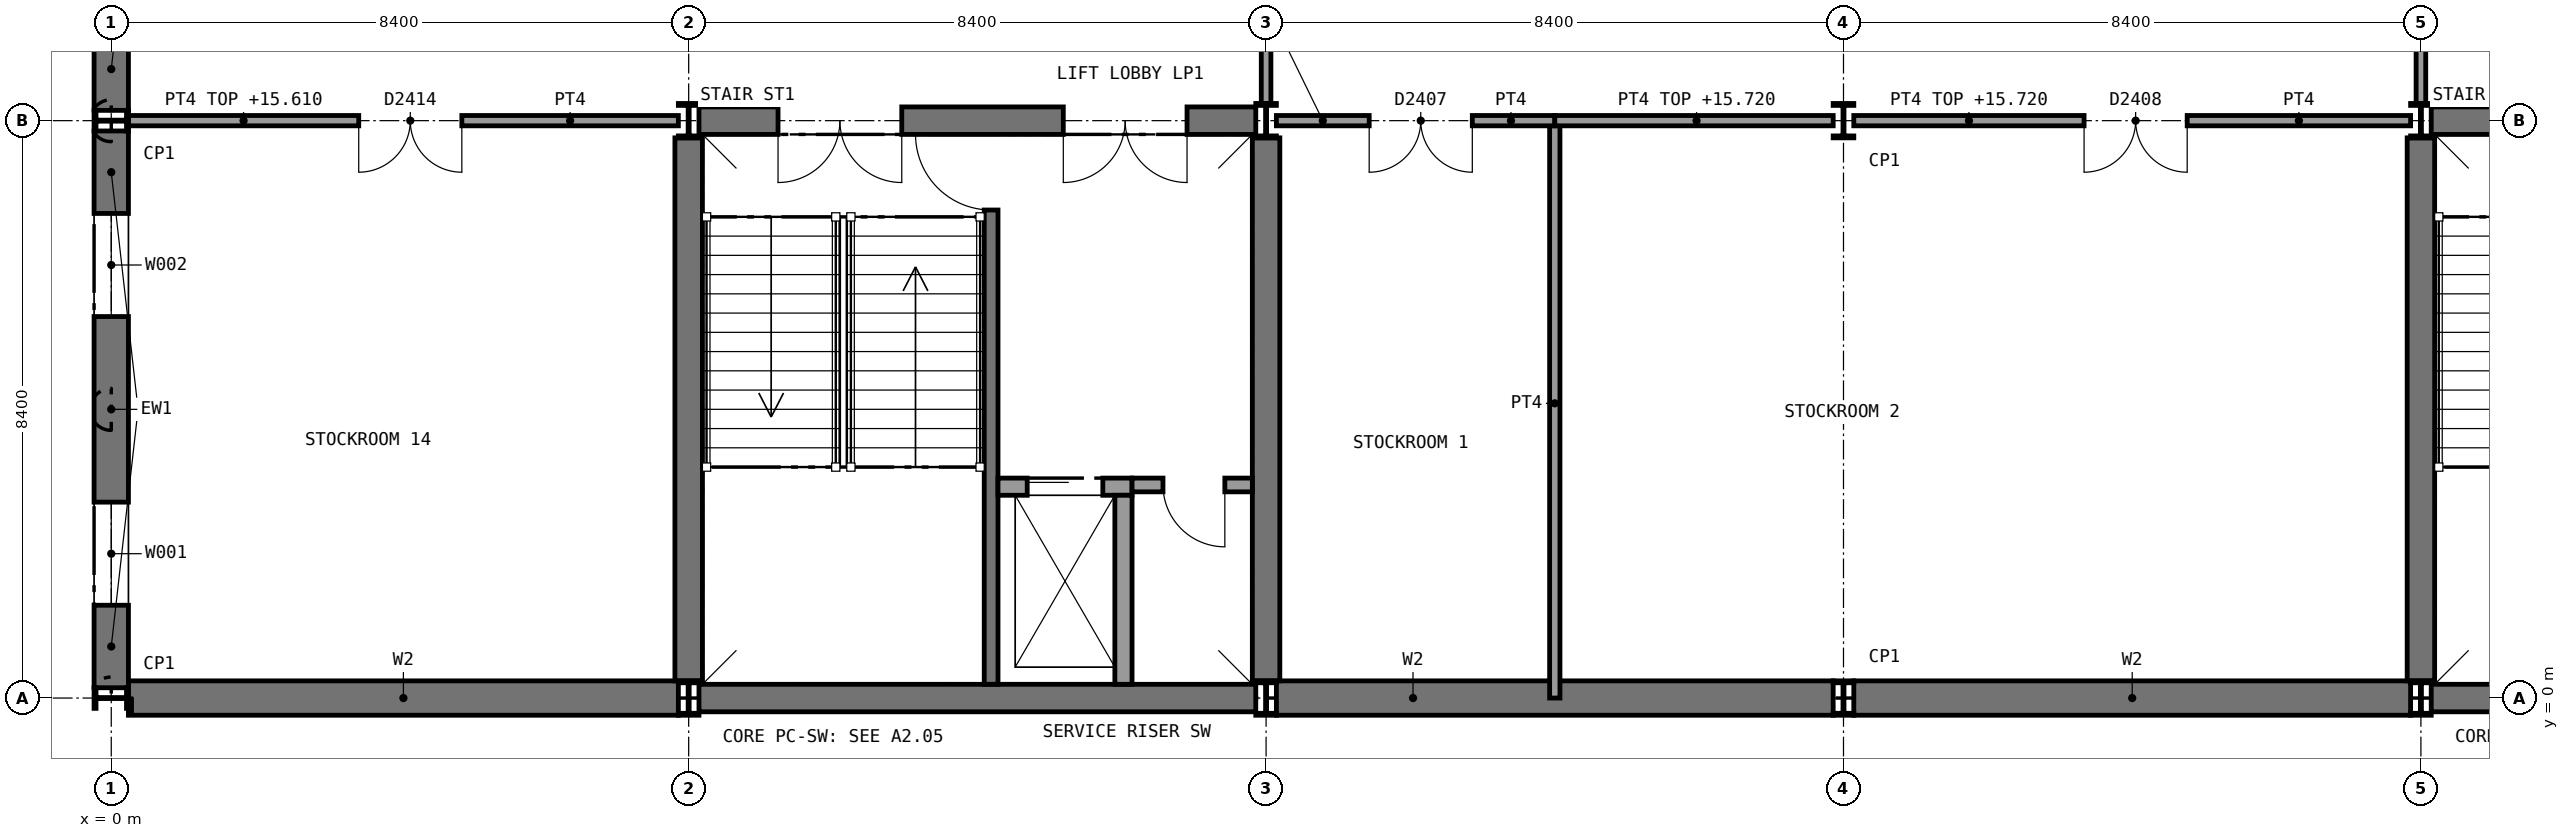
"""IFC4 building model, lengths in metres.
Left out: names, types, materials, properties, quantities, classifications, styles, units other than length and angle.
Written with IfcOpenShell. Run it as: python <this file> out.ifc"""

import sys

from ifc_helpers import new_model, si_unit, direction, frame, frame_2d, origin, origin_2d, place, context, subcontext, project, spatial, rectangle, i_section, extrude, element, fill, save


model = new_model("IFC4")
c1 = context("Model", 3, precision=1e-05, world=origin(), true_north=direction((0.0, 1.0)))
c2 = subcontext(c1, "Body", "Model", "MODEL_VIEW")
j1 = project(units=[si_unit("LENGTHUNIT", "METRE"), si_unit("PLANEANGLEUNIT", "RADIAN")], contexts=[c1])
p1 = place(None, origin())
s1 = spatial("IfcSite", under=j1, at=p1, CompositionType="ELEMENT")
p2 = place(p1, origin())
s2 = spatial("IfcBuilding", under=s1, at=p2, CompositionType="ELEMENT")
p3 = place(p2, frame((0.0, 0.0, 11.4)))
s3 = spatial("IfcBuildingStorey", under=s2, at=p3, CompositionType="ELEMENT", Elevation=11.4)
p4 = place(p3, frame((0.25, 0.0, 0.0), z_axis=(0.0, 0.0, 1.0), x_axis=(1.0, 0.0, 0.0)))
e1 = element("IfcWall", 1, at=p4, inside=s3, PredefinedType="SHEAR", context=c2, shape_type="SweptSolid", body=[
    extrude(rectangle(XDim=8.0, YDim=0.5, at=frame_2d((4.0, 0.0))), origin(), (0.0, 0.0, 1.0), 4.65),
])
p5 = place(p3, frame((16.95, 0.0, 0.0), z_axis=(0.0, 0.0, 1.0), x_axis=(1.0, 0.0, 0.0)))
e2 = element("IfcWall", 2, at=p5, inside=s3, PredefinedType="SHEAR", context=c2, shape_type="SweptSolid", body=[
    extrude(rectangle(XDim=8.1, YDim=0.5, at=frame_2d((4.05, 0.0))), origin(), (0.0, 0.0, 1.0), 4.65),
])
p6 = place(p3, frame((25.35, 0.0, 0.0), z_axis=(0.0, 0.0, 1.0), x_axis=(1.0, 0.0, 0.0)))
e3 = element("IfcWall", 3, at=p6, inside=s3, PredefinedType="SHEAR", context=c2, shape_type="SweptSolid", body=[
    extrude(rectangle(XDim=8.1, YDim=0.5, at=frame_2d((4.05, 0.0))), origin(), (0.0, 0.0, 1.0), 4.65),
])
p7 = place(p3, frame((8.55, 0.0, 0.0), z_axis=(0.0, 0.0, 1.0), x_axis=(1.0, 0.0, 0.0)))
e4 = element("IfcWall", 4, at=p7, inside=s3, PredefinedType="SHEAR", context=c2, shape_type="SweptSolid", body=[
    extrude(rectangle(XDim=8.1, YDim=0.4, at=frame_2d((4.05, 0.0))), origin(), (0.0, 0.0, 1.0), 4.65),
])
p8 = place(p3, frame((8.55, 8.4, 0.0), z_axis=(0.0, 0.0, 1.0), x_axis=(1.0, 0.0, 0.0)))
e5 = element("IfcWall", 5, at=p8, inside=s3, PredefinedType="SHEAR", context=c2, shape_type="SweptSolid", body=[
    extrude(rectangle(XDim=8.1, YDim=0.4, at=frame_2d((4.05, 0.0))), origin(), (0.0, 0.0, 1.0), 4.65),
])
p9 = place(p8, frame((1.15, 0.0, 0.0)))
e6 = element("IfcOpeningElement", 6, at=p9, cuts=e5, PredefinedType="OPENING", context=c2, shape_type="SweptSolid", body=[
    extrude(rectangle(XDim=1.8, YDim=2.1, at=frame_2d((0.9, 1.05))), frame((0.0, 0.21, 0.0), z_axis=(0.0, -1.0, 0.0), x_axis=(1.0, 0.0, 0.0)), (0.0, 0.0, 1.0), 0.42),
])
p10 = place(p8, frame((5.3, 0.0, 0.0)))
e7 = element("IfcOpeningElement", 7, at=p10, cuts=e5, PredefinedType="OPENING", context=c2, shape_type="SweptSolid", body=[
    extrude(rectangle(XDim=1.8, YDim=2.1, at=frame_2d((0.9, 1.05))), frame((0.0, 0.21, 0.0), z_axis=(0.0, -1.0, 0.0), x_axis=(1.0, 0.0, 0.0)), (0.0, 0.0, 1.0), 0.42),
])
for number, where, z_axis, x_axis in (
    (8, (8.4, 0.25, 0.0), (0.0, 0.0, 1.0), (0.0, 1.0, 0.0)),
    (9, (16.8, 0.25, 0.0), (0.0, 0.0, 1.0), (0.0, 1.0, 0.0)),
):
    element("IfcWall", number, at=place(p3, frame(where, z_axis=z_axis, x_axis=x_axis)), inside=s3, PredefinedType="SHEAR", context=c2, shape_type="SweptSolid", body=[
        extrude(rectangle(XDim=7.9, YDim=0.4, at=frame_2d((3.95, 0.0))), origin(), (0.0, 0.0, 1.0), 4.65),
    ])
p11 = place(p3, frame((33.75, 0.0, 0.0), z_axis=(0.0, 0.0, 1.0), x_axis=(1.0, 0.0, 0.0)))
e10 = element("IfcWall", 10, at=p11, inside=s3, PredefinedType="SHEAR", context=c2, shape_type="SweptSolid", body=[
    extrude(rectangle(XDim=8.1, YDim=0.4, at=frame_2d((4.05, 0.0))), origin(), (0.0, 0.0, 1.0), 4.65),
])
p12 = place(p3, frame((33.75, 8.4, 0.0), z_axis=(0.0, 0.0, 1.0), x_axis=(1.0, 0.0, 0.0)))
e11 = element("IfcWall", 11, at=p12, inside=s3, PredefinedType="SHEAR", context=c2, shape_type="SweptSolid", body=[
    extrude(rectangle(XDim=8.1, YDim=0.4, at=frame_2d((4.05, 0.0))), origin(), (0.0, 0.0, 1.0), 4.65),
])
p13 = place(p12, frame((1.15, 0.0, 0.0)))
e12 = element("IfcOpeningElement", 12, at=p13, cuts=e11, PredefinedType="OPENING", context=c2, shape_type="SweptSolid", body=[
    extrude(rectangle(XDim=1.8, YDim=2.1, at=frame_2d((0.9, 1.05))), frame((0.0, 0.21, 0.0), z_axis=(0.0, -1.0, 0.0), x_axis=(1.0, 0.0, 0.0)), (0.0, 0.0, 1.0), 0.42),
])
p14 = place(p12, frame((5.3, 0.0, 0.0)))
e13 = element("IfcOpeningElement", 13, at=p14, cuts=e11, PredefinedType="OPENING", context=c2, shape_type="SweptSolid", body=[
    extrude(rectangle(XDim=1.8, YDim=2.1, at=frame_2d((0.9, 1.05))), frame((0.0, 0.21, 0.0), z_axis=(0.0, -1.0, 0.0), x_axis=(1.0, 0.0, 0.0)), (0.0, 0.0, 1.0), 0.42),
])
p15 = place(p3, frame((33.6, 0.25, 0.0), z_axis=(0.0, 0.0, 1.0), x_axis=(0.0, 1.0, 0.0)))
e14 = element("IfcWall", 14, at=p15, inside=s3, PredefinedType="SHEAR", context=c2, shape_type="SweptSolid", body=[
    extrude(rectangle(XDim=7.9, YDim=0.4, at=frame_2d((3.95, 0.0))), origin(), (0.0, 0.0, 1.0), 4.65),
])
for number, where, z_axis, x_axis in (
    (15, (0.0, 0.0, 0.0), (0.0, 0.0, 1.0), (0.0, 1.0, 0.0)),
    (16, (0.0, 8.4, 0.0), (0.0, 0.0, 1.0), (0.0, 1.0, 0.0)),
    (17, (8.4, 0.0, 0.0), (0.0, 0.0, 1.0), (1.0, 0.0, 0.0)),
    (18, (8.4, 8.4, 0.0), (0.0, 0.0, 1.0), (1.0, 0.0, 0.0)),
    (19, (16.8, 0.0, 0.0), (0.0, 0.0, 1.0), (1.0, 0.0, 0.0)),
    (20, (16.8, 8.4, 0.0), (0.0, 0.0, 1.0), (1.0, 0.0, 0.0)),
    (21, (25.2, 0.0, 0.0), (0.0, 0.0, 1.0), (1.0, 0.0, 0.0)),
    (22, (25.2, 8.4, 0.0), (0.0, 0.0, 1.0), (1.0, 0.0, 0.0)),
    (23, (33.6, 0.0, 0.0), (0.0, 0.0, 1.0), (1.0, 0.0, 0.0)),
    (24, (33.6, 8.4, 0.0), (0.0, 0.0, 1.0), (1.0, 0.0, 0.0)),
):
    element("IfcColumn", number, at=place(p3, frame(where, z_axis=z_axis, x_axis=x_axis)), inside=s3, PredefinedType="COLUMN", context=c2, shape_type="SweptSolid", body=[
        extrude(i_section(OverallWidth=0.3, OverallDepth=0.5, WebThickness=0.014, FlangeThickness=0.028, FilletRadius=0.027, at=origin_2d()), origin(), (0.0, 0.0, 1.0), 4.8),
    ])
p16 = place(p3, frame((21.0, 0.0, 0.0), z_axis=(0.0, 0.0, 1.0), x_axis=(0.0, 1.0, 0.0)))
e25 = element("IfcWall", 25, at=p16, inside=s3, PredefinedType="SOLIDWALL", context=c2, shape_type="SweptSolid", body=[
    extrude(rectangle(XDim=8.4, YDim=0.15, at=frame_2d((4.2, 0.0))), origin(), (0.0, 0.0, 1.0), 4.65),
])
p17 = place(p3, frame((16.95, 8.4, 0.0), z_axis=(0.0, 0.0, 1.0), x_axis=(1.0, 0.0, 0.0)))
e26 = element("IfcWall", 26, at=p17, inside=s3, PredefinedType="SOLIDWALL", context=c2, shape_type="SweptSolid", body=[
    extrude(rectangle(XDim=4.05, YDim=0.15, at=frame_2d((2.025, 0.0))), origin(), (0.0, 0.0, 1.0), 4.32),
])
p18 = place(p17, frame((1.35, 0.0, 0.0)))
e27 = element("IfcOpeningElement", 27, at=p18, cuts=e26, PredefinedType="OPENING", context=c2, shape_type="SweptSolid", body=[
    extrude(rectangle(XDim=1.5, YDim=2.1, at=frame_2d((0.75, 1.05))), frame((0.0, 0.085, 0.0), z_axis=(0.0, -1.0, 0.0), x_axis=(1.0, 0.0, 0.0)), (0.0, 0.0, 1.0), 0.17),
])
p19 = place(p3, frame((21.0, 8.4, 0.0), z_axis=(0.0, 0.0, 1.0), x_axis=(1.0, 0.0, 0.0)))
e28 = element("IfcWall", 28, at=p19, inside=s3, PredefinedType="SOLIDWALL", context=c2, shape_type="SweptSolid", body=[
    extrude(rectangle(XDim=4.05, YDim=0.15, at=frame_2d((2.025, 0.0))), origin(), (0.0, 0.0, 1.0), 4.32),
])
p20 = place(p3, frame((25.35, 8.4, 0.0), z_axis=(0.0, 0.0, 1.0), x_axis=(1.0, 0.0, 0.0)))
e29 = element("IfcWall", 29, at=p20, inside=s3, PredefinedType="SOLIDWALL", context=c2, shape_type="SweptSolid", body=[
    extrude(rectangle(XDim=8.1, YDim=0.15, at=frame_2d((4.05, 0.0))), origin(), (0.0, 0.0, 1.0), 4.32),
])
p21 = place(p20, frame((3.35, 0.0, 0.0)))
e30 = element("IfcOpeningElement", 30, at=p21, cuts=e29, PredefinedType="OPENING", context=c2, shape_type="SweptSolid", body=[
    extrude(rectangle(XDim=1.5, YDim=2.1, at=frame_2d((0.75, 1.05))), frame((0.0, 0.085, 0.0), z_axis=(0.0, -1.0, 0.0), x_axis=(1.0, 0.0, 0.0)), (0.0, 0.0, 1.0), 0.17),
])
p22 = place(p3, frame((0.25, 8.4, 0.0), z_axis=(0.0, 0.0, 1.0), x_axis=(1.0, 0.0, 0.0)))
e31 = element("IfcWall", 31, at=p22, inside=s3, PredefinedType="SOLIDWALL", context=c2, shape_type="SweptSolid", body=[
    extrude(rectangle(XDim=8.0, YDim=0.15, at=frame_2d((4.0, 0.0))), origin(), (0.0, 0.0, 1.0), 4.21),
])
p23 = place(p22, frame((3.35, 0.0, 0.0)))
e32 = element("IfcOpeningElement", 32, at=p23, cuts=e31, PredefinedType="OPENING", context=c2, shape_type="SweptSolid", body=[
    extrude(rectangle(XDim=1.5, YDim=2.1, at=frame_2d((0.75, 1.05))), frame((0.0, 0.085, 0.0), z_axis=(0.0, -1.0, 0.0), x_axis=(1.0, 0.0, 0.0)), (0.0, 0.0, 1.0), 0.17),
])
for number, where, z_axis, x_axis in (
    (33, (16.8, 8.65, 0.0), (0.0, 0.0, 1.0), (0.0, 1.0, 0.0)),
    (34, (33.6, 8.65, 0.0), (0.0, 0.0, 1.0), (0.0, 1.0, 0.0)),
):
    element("IfcWall", number, at=place(p3, frame(where, z_axis=z_axis, x_axis=x_axis)), inside=s3, PredefinedType="PARTITIONING", context=c2, shape_type="SweptSolid", body=[
        extrude(rectangle(XDim=3.1, YDim=0.14, at=frame_2d((1.55, 0.0))), origin(), (0.0, 0.0, 1.0), 4.21),
    ])
p24 = place(p3, frame((0.0, 0.15, 0.0), z_axis=(0.0, 0.0, 1.0), x_axis=(0.0, 1.0, 0.0)))
e35 = element("IfcWall", 35, at=p24, inside=s3, PredefinedType="STANDARD", context=c2, shape_type="SweptSolid", body=[
    extrude(rectangle(XDim=8.1, YDim=0.5, at=frame_2d((4.05, 0.0))), origin(), (0.0, 0.0, 1.0), 4.65),
])
p25 = place(p24, frame((1.2, 0.0, 0.9)))
e36 = element("IfcOpeningElement", 36, at=p25, cuts=e35, PredefinedType="OPENING", context=c2, shape_type="SweptSolid", body=[
    extrude(rectangle(XDim=1.5, YDim=3.0, at=frame_2d((0.75, 1.5))), frame((0.0, 0.26, 0.0), z_axis=(0.0, -1.0, 0.0), x_axis=(1.0, 0.0, 0.0)), (0.0, 0.0, 1.0), 0.52),
])
p26 = place(p24, frame((5.4, 0.0, 0.9)))
e37 = element("IfcOpeningElement", 37, at=p26, cuts=e35, PredefinedType="OPENING", context=c2, shape_type="SweptSolid", body=[
    extrude(rectangle(XDim=1.5, YDim=3.0, at=frame_2d((0.75, 1.5))), frame((0.0, 0.26, 0.0), z_axis=(0.0, -1.0, 0.0), x_axis=(1.0, 0.0, 0.0)), (0.0, 0.0, 1.0), 0.52),
])
p27 = place(p3, frame((0.0, 8.55, 0.0), z_axis=(0.0, 0.0, 1.0), x_axis=(0.0, 1.0, 0.0)))
e38 = element("IfcWall", 38, at=p27, inside=s3, PredefinedType="STANDARD", context=c2, shape_type="SweptSolid", body=[
    extrude(rectangle(XDim=8.1, YDim=0.5, at=frame_2d((4.05, 0.0))), origin(), (0.0, 0.0, 1.0), 4.65),
])
p28 = place(p27, frame((1.2, 0.0, 0.9)))
e39 = element("IfcOpeningElement", 39, at=p28, cuts=e38, PredefinedType="OPENING", context=c2, shape_type="SweptSolid", body=[
    extrude(rectangle(XDim=1.5, YDim=3.0, at=frame_2d((0.75, 1.5))), frame((0.0, 0.26, 0.0), z_axis=(0.0, -1.0, 0.0), x_axis=(1.0, 0.0, 0.0)), (0.0, 0.0, 1.0), 0.52),
])
p29 = place(p27, frame((5.4, 0.0, 0.9)))
e40 = element("IfcOpeningElement", 40, at=p29, cuts=e38, PredefinedType="OPENING", context=c2, shape_type="SweptSolid", body=[
    extrude(rectangle(XDim=1.5, YDim=3.0, at=frame_2d((0.75, 1.5))), frame((0.0, 0.26, 0.0), z_axis=(0.0, -1.0, 0.0), x_axis=(1.0, 0.0, 0.0)), (0.0, 0.0, 1.0), 0.52),
])
p30 = place(p3, frame((12.8, 0.2, 0.0), z_axis=(0.0, 0.0, 1.0), x_axis=(0.0, 1.0, 0.0)))
e41 = element("IfcWall", 41, at=p30, inside=s3, PredefinedType="SHEAR", context=c2, shape_type="SweptSolid", body=[
    extrude(rectangle(XDim=8.0, YDim=0.2, at=frame_2d((4.0, 0.0))), origin(), (0.0, 0.0, 1.0), 4.65),
])
p31 = place(p30, frame((6.9, 0.0, 0.0)))
e42 = element("IfcOpeningElement", 42, at=p31, cuts=e41, PredefinedType="OPENING", context=c2, shape_type="SweptSolid", body=[
    extrude(rectangle(XDim=1.11, YDim=2.1, at=frame_2d((0.555, 1.05))), frame((0.0, 0.11, 0.0), z_axis=(0.0, -1.0, 0.0), x_axis=(1.0, 0.0, 0.0)), (0.0, 0.0, 1.0), 0.22),
])
p32 = place(p3, frame((12.9, 3.075, 0.0), z_axis=(0.0, 0.0, 1.0), x_axis=(1.0, 0.0, 0.0)))
e43 = element("IfcWall", 43, at=p32, inside=s3, PredefinedType="SOLIDWALL", context=c2, shape_type="SweptSolid", body=[
    extrude(rectangle(XDim=1.95, YDim=0.25, at=frame_2d((0.975, 0.0))), origin(), (0.0, 0.0, 1.0), 4.8),
])
p33 = place(p32, frame((0.425, 0.0, 0.0)))
e44 = element("IfcOpeningElement", 44, at=p33, cuts=e43, PredefinedType="OPENING", context=c2, shape_type="SweptSolid", body=[
    extrude(rectangle(XDim=1.1, YDim=2.1, at=frame_2d((0.55, 1.05))), frame((0.0, 0.135, 0.0), z_axis=(0.0, -1.0, 0.0), x_axis=(1.0, 0.0, 0.0)), (0.0, 0.0, 1.0), 0.27),
])
p34 = place(p3, frame((14.725, 0.2, 0.0), z_axis=(0.0, 0.0, 1.0), x_axis=(0.0, 1.0, 0.0)))
e45 = element("IfcWall", 45, at=p34, inside=s3, PredefinedType="SOLIDWALL", context=c2, shape_type="SweptSolid", body=[
    extrude(rectangle(XDim=2.75, YDim=0.25, at=frame_2d((1.375, 0.0))), origin(), (0.0, 0.0, 1.0), 4.8),
])
p35 = place(p3, frame((14.85, 3.1, 0.0), z_axis=(0.0, 0.0, 1.0), x_axis=(1.0, 0.0, 0.0)))
e46 = element("IfcWall", 46, at=p35, inside=s3, PredefinedType="PARTITIONING", context=c2, shape_type="SweptSolid", body=[
    extrude(rectangle(XDim=1.75, YDim=0.2, at=frame_2d((0.875, 0.0))), origin(), (0.0, 0.0, 1.0), 4.65),
])
p36 = place(p35, frame((0.45, 0.0, 0.0)))
e47 = element("IfcOpeningElement", 47, at=p36, cuts=e46, PredefinedType="OPENING", context=c2, shape_type="SweptSolid", body=[
    extrude(rectangle(XDim=0.9, YDim=2.1, at=frame_2d((0.45, 1.05))), frame((0.0, 0.11, 0.0), z_axis=(0.0, -1.0, 0.0), x_axis=(1.0, 0.0, 0.0)), (0.0, 0.0, 1.0), 0.22),
])
p37 = place(p18, frame((1.5, 0.0, 0.0), z_axis=(0.0, 0.0, 1.0), x_axis=(-1.0, 0.0, 0.0)))
e48 = element("IfcDoor", 48, at=p37, inside=s3, OperationType="DOUBLE_DOOR_SINGLE_SWING", PredefinedType="DOOR", context=c2, shape_type="SweptSolid", body=[
    extrude(rectangle(XDim=1.5, YDim=2.1, at=frame_2d((0.75, 1.05))), frame((0.0, 0.025, 0.0), z_axis=(0.0, -1.0, 0.0), x_axis=(1.0, 0.0, 0.0)), (0.0, 0.0, 1.0), 0.05),
])
fill(e27, e48)
p38 = place(p21, frame((1.5, 0.0, 0.0), z_axis=(0.0, 0.0, 1.0), x_axis=(-1.0, 0.0, 0.0)))
e49 = element("IfcDoor", 49, at=p38, inside=s3, OperationType="DOUBLE_DOOR_SINGLE_SWING", PredefinedType="DOOR", context=c2, shape_type="SweptSolid", body=[
    extrude(rectangle(XDim=1.5, YDim=2.1, at=frame_2d((0.75, 1.05))), frame((0.0, 0.025, 0.0), z_axis=(0.0, -1.0, 0.0), x_axis=(1.0, 0.0, 0.0)), (0.0, 0.0, 1.0), 0.05),
])
fill(e30, e49)
p39 = place(p23, frame((1.5, 0.0, 0.0), z_axis=(0.0, 0.0, 1.0), x_axis=(-1.0, 0.0, 0.0)))
e50 = element("IfcDoor", 50, at=p39, inside=s3, OperationType="DOUBLE_DOOR_SINGLE_SWING", PredefinedType="DOOR", context=c2, shape_type="SweptSolid", body=[
    extrude(rectangle(XDim=1.5, YDim=2.1, at=frame_2d((0.75, 1.05))), frame((0.0, 0.025, 0.0), z_axis=(0.0, -1.0, 0.0), x_axis=(1.0, 0.0, 0.0)), (0.0, 0.0, 1.0), 0.05),
])
fill(e32, e50)
p40 = place(p25, origin())
e51 = element("IfcWindow", 51, at=p40, inside=s3, PartitioningType="SINGLE_PANEL", PredefinedType="WINDOW", context=c2, shape_type="SweptSolid", body=[
    extrude(rectangle(XDim=1.5, YDim=3.0, at=frame_2d((0.75, 1.5))), frame((0.0, 0.03, 0.0), z_axis=(0.0, -1.0, 0.0), x_axis=(1.0, 0.0, 0.0)), (0.0, 0.0, 1.0), 0.06),
])
fill(e36, e51)
p41 = place(p26, origin())
e52 = element("IfcWindow", 52, at=p41, inside=s3, PartitioningType="SINGLE_PANEL", PredefinedType="WINDOW", context=c2, shape_type="SweptSolid", body=[
    extrude(rectangle(XDim=1.5, YDim=3.0, at=frame_2d((0.75, 1.5))), frame((0.0, 0.03, 0.0), z_axis=(0.0, -1.0, 0.0), x_axis=(1.0, 0.0, 0.0)), (0.0, 0.0, 1.0), 0.06),
])
fill(e37, e52)
p42 = place(p31, origin())
e53 = element("IfcDoor", 53, at=p42, inside=s3, OperationType="SINGLE_SWING_RIGHT", PredefinedType="DOOR", context=c2, shape_type="SweptSolid", body=[
    extrude(rectangle(XDim=1.1, YDim=2.1, at=frame_2d((0.55, 1.05))), frame((0.0, 0.025, 0.0), z_axis=(0.0, -1.0, 0.0), x_axis=(1.0, 0.0, 0.0)), (0.0, 0.0, 1.0), 0.05),
])
fill(e42, e53)
p43 = place(p33, origin())
e54 = element("IfcDoor", 54, at=p43, inside=s3, OperationType="SLIDING_TO_LEFT", PredefinedType="DOOR", context=c2, shape_type="SweptSolid", body=[
    extrude(rectangle(XDim=1.1, YDim=2.1, at=frame_2d((0.55, 1.05))), frame((0.0, 0.025, 0.0), z_axis=(0.0, -1.0, 0.0), x_axis=(1.0, 0.0, 0.0)), (0.0, 0.0, 1.0), 0.05),
])
fill(e44, e54)
p44 = place(p36, frame((0.9, 0.0, 0.0), z_axis=(0.0, 0.0, 1.0), x_axis=(-1.0, 0.0, 0.0)))
e55 = element("IfcDoor", 55, at=p44, inside=s3, OperationType="SINGLE_SWING_LEFT", PredefinedType="DOOR", context=c2, shape_type="SweptSolid", body=[
    extrude(rectangle(XDim=0.9, YDim=2.1, at=frame_2d((0.45, 1.05))), frame((0.0, 0.025, 0.0), z_axis=(0.0, -1.0, 0.0), x_axis=(1.0, 0.0, 0.0)), (0.0, 0.0, 1.0), 0.05),
])
fill(e47, e55)
p45 = place(p9, frame((1.8, 0.0, 0.0), z_axis=(0.0, 0.0, 1.0), x_axis=(-1.0, 0.0, 0.0)))
e56 = element("IfcDoor", 56, at=p45, inside=s3, OperationType="DOUBLE_DOOR_SINGLE_SWING", PredefinedType="DOOR", context=c2, shape_type="SweptSolid", body=[
    extrude(rectangle(XDim=1.8, YDim=2.1, at=frame_2d((0.9, 1.05))), frame((0.0, 0.025, 0.0), z_axis=(0.0, -1.0, 0.0), x_axis=(1.0, 0.0, 0.0)), (0.0, 0.0, 1.0), 0.05),
])
fill(e6, e56)
p46 = place(p10, frame((1.8, 0.0, 0.0), z_axis=(0.0, 0.0, 1.0), x_axis=(-1.0, 0.0, 0.0)))
e57 = element("IfcDoor", 57, at=p46, inside=s3, OperationType="DOUBLE_DOOR_SINGLE_SWING", PredefinedType="DOOR", context=c2, shape_type="SweptSolid", body=[
    extrude(rectangle(XDim=1.8, YDim=2.1, at=frame_2d((0.9, 1.05))), frame((0.0, 0.025, 0.0), z_axis=(0.0, -1.0, 0.0), x_axis=(1.0, 0.0, 0.0)), (0.0, 0.0, 1.0), 0.05),
])
fill(e7, e57)
save(model, sys.argv[1])
